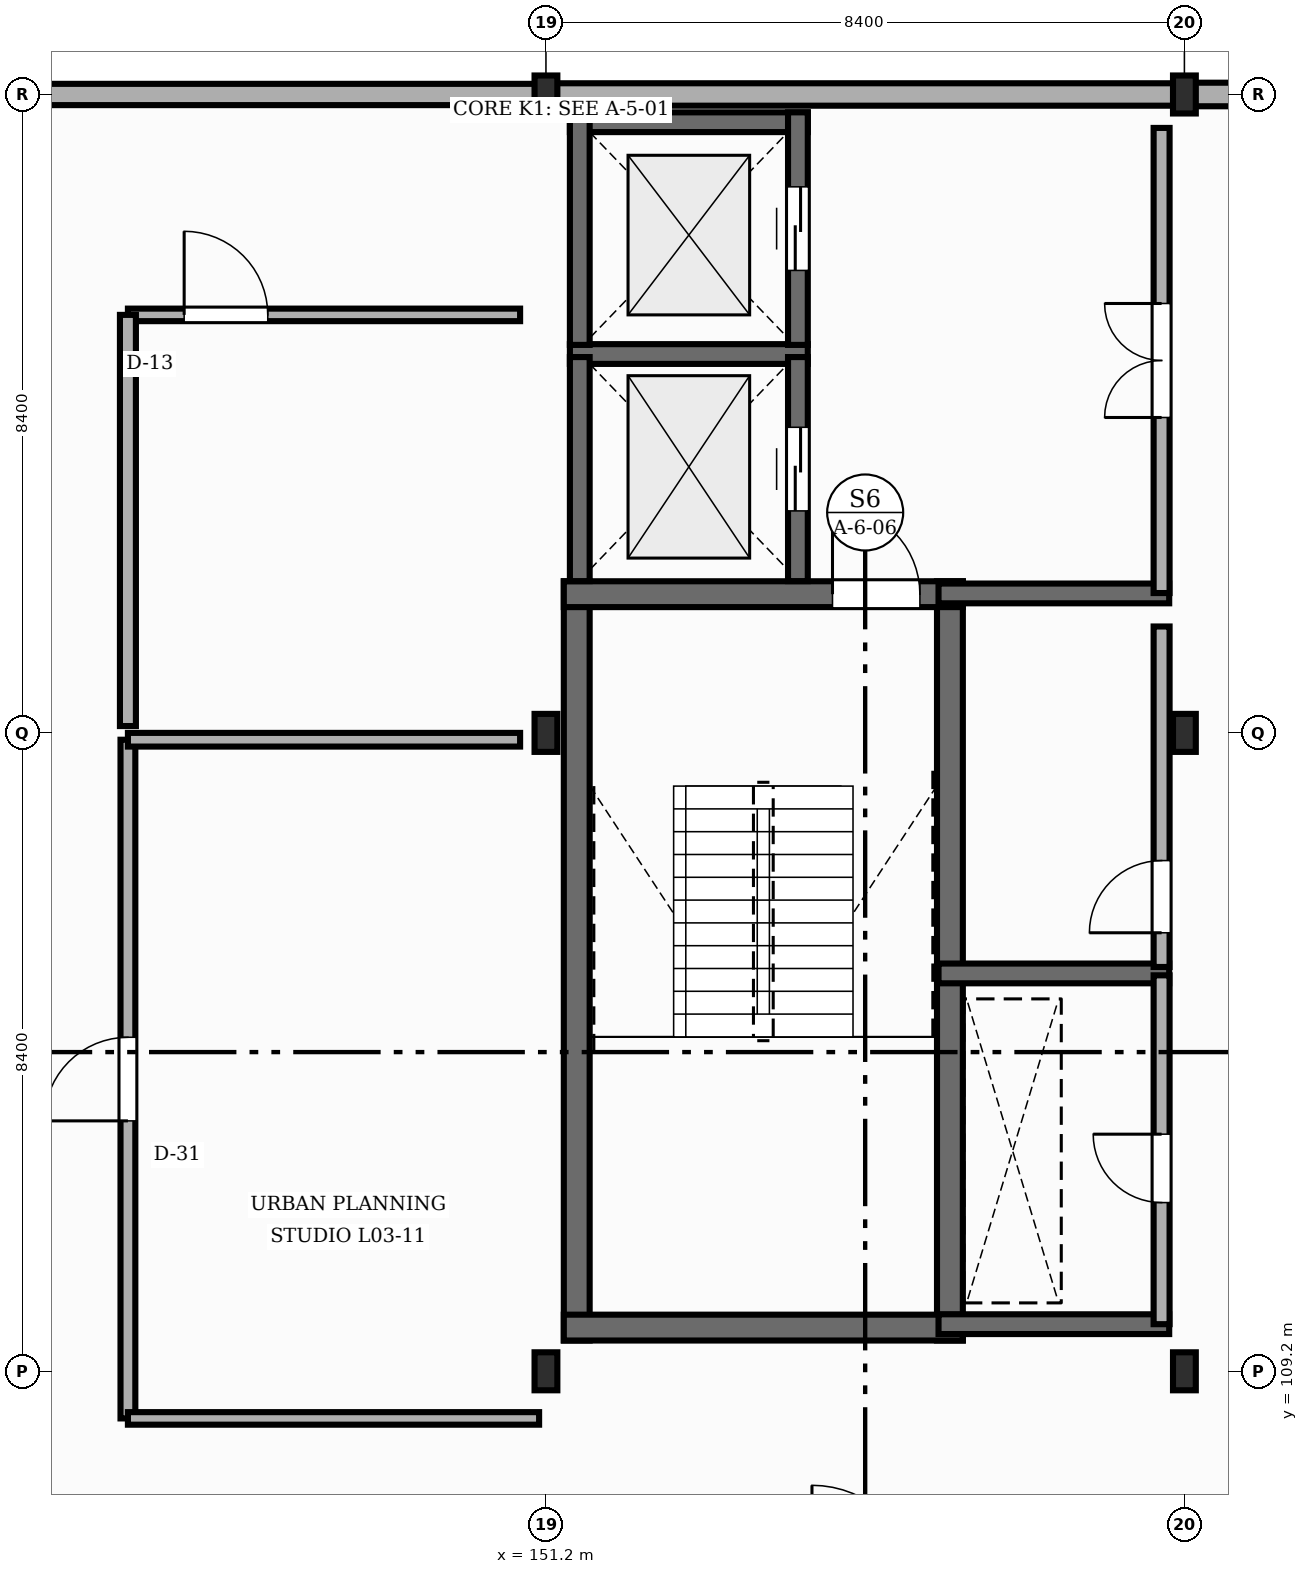
"""IFC4 building model, lengths in metres.
Left out: names, types, materials, properties, quantities, classifications, styles, units other than length and angle.
Written with IfcOpenShell. Run it as: python <this file> out.ifc"""

import sys

from ifc_helpers import new_model, si_unit, direction, frame, frame_2d, origin, origin_2d, place, context, subcontext, project, spatial, rectangle, i_section, extrude, element, fill, save


model = new_model("IFC4")
c1 = context("Model", 3, precision=1e-05, world=origin(), true_north=direction((0.0, 1.0)))
c2 = subcontext(c1, "Body", "Model", "MODEL_VIEW")
j1 = project(units=[si_unit("LENGTHUNIT", "METRE"), si_unit("PLANEANGLEUNIT", "RADIAN")], contexts=[c1])
p1 = place(None, origin())
s1 = spatial("IfcSite", under=j1, at=p1, CompositionType="ELEMENT")
p2 = place(p1, origin())
s2 = spatial("IfcBuilding", under=s1, at=p2, CompositionType="ELEMENT")
p3 = place(p2, frame((0.0, 0.0, 13.95)))
s3 = spatial("IfcBuildingStorey", under=s2, at=p3, CompositionType="ELEMENT", Elevation=13.95)
for number, where, z_axis, x_axis in (
    (1, (151.2, 109.2, 0.0), (0.0, 0.0, 1.0), (1.0, 0.0, 0.0)),
    (2, (151.2, 117.6, 0.0), (0.0, 0.0, 1.0), (1.0, 0.0, 0.0)),
    (3, (151.2, 126.0, 0.0), (0.0, 0.0, 1.0), (1.0, 0.0, 0.0)),
    (4, (159.6, 109.2, 0.0), (0.0, 0.0, 1.0), (1.0, 0.0, 0.0)),
    (5, (159.6, 117.6, 0.0), (0.0, 0.0, 1.0), (1.0, 0.0, 0.0)),
    (6, (159.6, 126.0, 0.0), (0.0, 0.0, 1.0), (1.0, 0.0, 0.0)),
):
    element("IfcColumn", number, at=place(p3, frame(where, z_axis=z_axis, x_axis=x_axis)), inside=s3, PredefinedType="COLUMN", context=c2, shape_type="SweptSolid", body=[
        extrude(i_section(OverallWidth=0.3, OverallDepth=0.5, WebThickness=0.014, FlangeThickness=0.028, FilletRadius=0.027, at=origin_2d()), origin(), (0.0, 0.0, 1.0), 4.05),
    ])
p4 = place(p3, frame((167.992, 126.0, 0.0), z_axis=(0.0, 0.0, 1.0), x_axis=(-1.0, 0.0, 0.0)))
e7 = element("IfcWall", 7, at=p4, inside=s3, PredefinedType="STANDARD", context=c2, shape_type="SweptSolid", body=[
    extrude(rectangle(XDim=8.384, YDim=0.31, at=frame_2d((4.192, 0.0))), origin(), (0.0, 0.0, 1.0), 3.487),
])
p5 = place(p3, frame((159.592, 126.0, 0.0), z_axis=(0.0, 0.0, 1.0), x_axis=(-1.0, 0.0, 0.0)))
e8 = element("IfcWall", 8, at=p5, inside=s3, PredefinedType="STANDARD", context=c2, shape_type="SweptSolid", body=[
    extrude(rectangle(XDim=8.384, YDim=0.295, at=frame_2d((4.192, 0.0))), origin(), (0.0, 0.0, 1.0), 3.517),
])
p6 = place(p3, frame((151.192, 126.0, 0.0), z_axis=(0.0, 0.0, 1.0), x_axis=(-1.0, 0.0, 0.0)))
e9 = element("IfcWall", 9, at=p6, inside=s3, PredefinedType="STANDARD", context=c2, shape_type="SweptSolid", body=[
    extrude(rectangle(XDim=8.384, YDim=0.28, at=frame_2d((4.192, 0.0))), origin(), (0.0, 0.0, 1.0), 3.487),
])
for number, where, z_axis, x_axis in (
    (10, (151.605, 109.605, 0.0), (0.0, 0.0, 1.0), (0.0, 1.0, 0.0)),
    (11, (156.515, 109.605, 0.0), (0.0, 0.0, 1.0), (0.0, 1.0, 0.0)),
):
    element("IfcWall", number, at=place(p3, frame(where, z_axis=z_axis, x_axis=x_axis)), inside=s3, PredefinedType="SHEAR", context=c2, shape_type="SweptSolid", body=[
        extrude(rectangle(XDim=9.99, YDim=0.34, at=frame_2d((4.995, 0.0))), origin(), (0.0, 0.0, 1.0), 3.85),
    ])
p7 = place(p3, frame((151.435, 109.775, 0.0), z_axis=(0.0, 0.0, 1.0), x_axis=(1.0, 0.0, 0.0)))
e12 = element("IfcWall", 12, at=p7, inside=s3, PredefinedType="SHEAR", context=c2, shape_type="SweptSolid", body=[
    extrude(rectangle(XDim=5.25, YDim=0.34, at=frame_2d((2.625, 0.0))), origin(), (0.0, 0.0, 1.0), 3.85),
])
p8 = place(p3, frame((151.435, 119.425, 0.0), z_axis=(0.0, 0.0, 1.0), x_axis=(1.0, 0.0, 0.0)))
e13 = element("IfcWall", 13, at=p8, inside=s3, PredefinedType="SHEAR", context=c2, shape_type="SweptSolid", body=[
    extrude(rectangle(XDim=5.25, YDim=0.34, at=frame_2d((2.625, 0.0))), origin(), (0.0, 0.0, 1.0), 3.85),
])
p9 = place(p8, frame((3.535, 0.0, 0.0)))
e14 = element("IfcOpeningElement", 14, at=p9, cuts=e13, PredefinedType="OPENING", context=c2, shape_type="SweptSolid", body=[
    extrude(rectangle(XDim=1.15, YDim=2.15, at=frame_2d((0.575, 1.075))), frame((0.0, 0.18, 0.0), z_axis=(0.0, -1.0, 0.0), x_axis=(1.0, 0.0, 0.0)), (0.0, 0.0, 1.0), 0.36),
])
p10 = place(p3, frame((151.515, 122.585, 0.0), z_axis=(0.0, 0.0, 1.0), x_axis=(1.0, 0.0, 0.0)))
e15 = element("IfcWall", 15, at=p10, inside=s3, PredefinedType="SHEAR", context=c2, shape_type="SweptSolid", body=[
    extrude(rectangle(XDim=3.13, YDim=0.26, at=frame_2d((1.565, 0.0))), origin(), (0.0, 0.0, 1.0), 3.85),
])
p11 = place(p3, frame((151.645, 119.597, 0.0), z_axis=(0.0, 0.0, 1.0), x_axis=(0.0, 1.0, 0.0)))
e16 = element("IfcWall", 16, at=p11, inside=s3, PredefinedType="SHEAR", context=c2, shape_type="SweptSolid", body=[
    extrude(rectangle(XDim=2.948, YDim=0.26, at=frame_2d((1.474, 0.0))), origin(), (0.0, 0.0, 1.0), 3.85),
])
p12 = place(p3, frame((154.515, 119.597, 0.0), z_axis=(0.0, 0.0, 1.0), x_axis=(0.0, 1.0, 0.0)))
e17 = element("IfcWall", 17, at=p12, inside=s3, PredefinedType="SHEAR", context=c2, shape_type="SweptSolid", body=[
    extrude(rectangle(XDim=2.948, YDim=0.26, at=frame_2d((1.474, 0.0))), origin(), (0.0, 0.0, 1.0), 3.85),
])
p13 = place(p12, frame((0.924, 0.0, 0.0)))
e18 = element("IfcOpeningElement", 18, at=p13, cuts=e17, PredefinedType="OPENING", context=c2, shape_type="SweptSolid", body=[
    extrude(rectangle(XDim=1.1, YDim=2.15, at=frame_2d((0.55, 1.075))), frame((0.0, 0.14, 0.0), z_axis=(0.0, -1.0, 0.0), x_axis=(1.0, 0.0, 0.0)), (0.0, 0.0, 1.0), 0.28),
])
p14 = place(p3, frame((151.515, 125.635, 0.0), z_axis=(0.0, 0.0, 1.0), x_axis=(1.0, 0.0, 0.0)))
e19 = element("IfcWall", 19, at=p14, inside=s3, PredefinedType="SHEAR", context=c2, shape_type="SweptSolid", body=[
    extrude(rectangle(XDim=3.13, YDim=0.26, at=frame_2d((1.565, 0.0))), origin(), (0.0, 0.0, 1.0), 3.85),
])
p15 = place(p3, frame((151.645, 122.705, 0.0), z_axis=(0.0, 0.0, 1.0), x_axis=(0.0, 1.0, 0.0)))
e20 = element("IfcWall", 20, at=p15, inside=s3, PredefinedType="SHEAR", context=c2, shape_type="SweptSolid", body=[
    extrude(rectangle(XDim=3.06, YDim=0.26, at=frame_2d((1.53, 0.0))), origin(), (0.0, 0.0, 1.0), 3.85),
])
p16 = place(p3, frame((154.515, 122.705, 0.0), z_axis=(0.0, 0.0, 1.0), x_axis=(0.0, 1.0, 0.0)))
e21 = element("IfcWall", 21, at=p16, inside=s3, PredefinedType="SHEAR", context=c2, shape_type="SweptSolid", body=[
    extrude(rectangle(XDim=3.06, YDim=0.26, at=frame_2d((1.53, 0.0))), origin(), (0.0, 0.0, 1.0), 3.85),
])
p17 = place(p16, frame((0.98, 0.0, 0.0)))
e22 = element("IfcOpeningElement", 22, at=p17, cuts=e21, PredefinedType="OPENING", context=c2, shape_type="SweptSolid", body=[
    extrude(rectangle(XDim=1.1, YDim=2.15, at=frame_2d((0.55, 1.075))), frame((0.0, 0.14, 0.0), z_axis=(0.0, -1.0, 0.0), x_axis=(1.0, 0.0, 0.0)), (0.0, 0.0, 1.0), 0.28),
])
for number, where, z_axis, x_axis in (
    (23, (156.365, 109.82, 0.0), (0.0, 0.0, 1.0), (1.0, 0.0, 0.0)),
    (24, (156.365, 114.435, 0.0), (0.0, 0.0, 1.0), (1.0, 0.0, 0.0)),
    (25, (156.365, 119.435, 0.0), (0.0, 0.0, 1.0), (1.0, 0.0, 0.0)),
):
    element("IfcWall", number, at=place(p3, frame(where, z_axis=z_axis, x_axis=x_axis)), inside=s3, PredefinedType="SHEAR", context=c2, shape_type="SweptSolid", body=[
        extrude(rectangle(XDim=3.035, YDim=0.26, at=frame_2d((1.518, 0.0))), origin(), (0.0, 0.0, 1.0), 3.85),
    ])
p18 = place(p3, frame((159.3, 109.82, 0.0), z_axis=(0.0, 0.0, 1.0), x_axis=(0.0, 1.0, 0.0)))
e26 = element("IfcWall", 26, at=p18, inside=s3, PredefinedType="STANDARD", context=c2, shape_type="SweptSolid", body=[
    extrude(rectangle(XDim=4.59, YDim=0.21, at=frame_2d((2.295, 0.0))), origin(), (0.0, 0.0, 1.0), 3.447),
])
p19 = place(p18, frame((1.6, 0.0, 0.0)))
e27 = element("IfcOpeningElement", 27, at=p19, cuts=e26, PredefinedType="OPENING", context=c2, shape_type="SweptSolid", body=[
    extrude(rectangle(XDim=0.9, YDim=2.1, at=frame_2d((0.45, 1.05))), frame((0.0, 0.115, 0.0), z_axis=(0.0, -1.0, 0.0), x_axis=(1.0, 0.0, 0.0)), (0.0, 0.0, 1.0), 0.23),
])
p20 = place(p3, frame((159.3, 114.52, 0.0), z_axis=(0.0, 0.0, 1.0), x_axis=(0.0, 1.0, 0.0)))
e28 = element("IfcWall", 28, at=p20, inside=s3, PredefinedType="STANDARD", context=c2, shape_type="SweptSolid", body=[
    extrude(rectangle(XDim=4.48, YDim=0.21, at=frame_2d((2.24, 0.0))), origin(), (0.0, 0.0, 1.0), 3.447),
])
p21 = place(p20, frame((0.45, 0.0, 0.0)))
e29 = element("IfcOpeningElement", 29, at=p21, cuts=e28, PredefinedType="OPENING", context=c2, shape_type="SweptSolid", body=[
    extrude(rectangle(XDim=0.95, YDim=2.15, at=frame_2d((0.475, 1.075))), frame((0.0, 0.115, 0.0), z_axis=(0.0, -1.0, 0.0), x_axis=(1.0, 0.0, 0.0)), (0.0, 0.0, 1.0), 0.23),
])
p22 = place(p3, frame((159.3, 119.44, 0.0), z_axis=(0.0, 0.0, 1.0), x_axis=(0.0, 1.0, 0.0)))
e30 = element("IfcWall", 30, at=p22, inside=s3, PredefinedType="STANDARD", context=c2, shape_type="SweptSolid", body=[
    extrude(rectangle(XDim=6.12, YDim=0.21, at=frame_2d((3.06, 0.0))), origin(), (0.0, 0.0, 1.0), 3.497),
])
p23 = place(p22, frame((2.31, 0.0, 0.0)))
e31 = element("IfcOpeningElement", 31, at=p23, cuts=e30, PredefinedType="OPENING", context=c2, shape_type="SweptSolid", body=[
    extrude(rectangle(XDim=1.5, YDim=2.2, at=frame_2d((0.75, 1.1))), frame((0.0, 0.115, 0.0), z_axis=(0.0, -1.0, 0.0), x_axis=(1.0, 0.0, 0.0)), (0.0, 0.0, 1.0), 0.23),
])
p24 = place(p3, frame((145.7, 108.58, -0.004), z_axis=(0.0, 0.0, 1.0), x_axis=(0.0, 1.0, 0.0)))
e32 = element("IfcWall", 32, at=p24, inside=s3, PredefinedType="STANDARD", context=c2, shape_type="SweptSolid", body=[
    extrude(rectangle(XDim=8.93, YDim=0.195, at=frame_2d((4.465, 0.0))), origin(), (0.0, 0.0, 1.0), 3.611),
])
p25 = place(p24, frame((3.915, 0.0, 0.0)))
e33 = element("IfcOpeningElement", 33, at=p25, cuts=e32, PredefinedType="OPENING", context=c2, shape_type="SweptSolid", body=[
    extrude(rectangle(XDim=1.1, YDim=2.3, at=frame_2d((0.55, 1.15))), frame((0.0, 0.107, 0.0), z_axis=(0.0, -1.0, 0.0), x_axis=(1.0, 0.0, 0.0)), (0.0, 0.0, 1.0), 0.215),
])
p26 = place(p3, frame((145.7, 117.51, -0.004), z_axis=(0.0, 0.0, 1.0), x_axis=(1.0, 0.0, 0.0)))
e34 = element("IfcWall", 34, at=p26, inside=s3, PredefinedType="STANDARD", context=c2, shape_type="SweptSolid", body=[
    extrude(rectangle(XDim=5.16, YDim=0.18, at=frame_2d((2.58, 0.0))), origin(), (0.0, 0.0, 1.0), 3.351),
])
p27 = place(p3, frame((151.11, 108.58, -0.004), z_axis=(0.0, 0.0, 1.0), x_axis=(-1.0, 0.0, 0.0)))
e35 = element("IfcWall", 35, at=p27, inside=s3, PredefinedType="STANDARD", context=c2, shape_type="SweptSolid", body=[
    extrude(rectangle(XDim=5.41, YDim=0.165, at=frame_2d((2.705, 0.0))), origin(), (0.0, 0.0, 1.0), 3.854),
])
p28 = place(p3, frame((145.7, 123.1, -0.004), z_axis=(0.0, 0.0, 1.0), x_axis=(1.0, 0.0, 0.0)))
e36 = element("IfcWall", 36, at=p28, inside=s3, PredefinedType="STANDARD", context=c2, shape_type="SweptSolid", body=[
    extrude(rectangle(XDim=5.16, YDim=0.165, at=frame_2d((2.58, 0.0))), origin(), (0.0, 0.0, 1.0), 3.854),
])
p29 = place(p28, frame((0.74, 0.0, 0.0)))
e37 = element("IfcOpeningElement", 37, at=p29, cuts=e36, PredefinedType="OPENING", context=c2, shape_type="SweptSolid", body=[
    extrude(rectangle(XDim=1.1, YDim=2.14, at=frame_2d((0.55, 1.07))), frame((0.0, 0.093, 0.0), z_axis=(0.0, -1.0, 0.0), x_axis=(1.0, 0.0, 0.0)), (0.0, 0.0, 1.0), 0.185),
])
p30 = place(p3, frame((145.7, 117.69, -0.004), z_axis=(0.0, 0.0, 1.0), x_axis=(0.0, 1.0, 0.0)))
e38 = element("IfcWall", 38, at=p30, inside=s3, PredefinedType="STANDARD", context=c2, shape_type="SweptSolid", body=[
    extrude(rectangle(XDim=5.41, YDim=0.21, at=frame_2d((2.705, 0.0))), origin(), (0.0, 0.0, 1.0), 3.551),
])
p31 = place(p9, origin())
e39 = element("IfcDoor", 39, at=p31, inside=s3, OperationType="SINGLE_SWING_LEFT", PredefinedType="DOOR", context=c2, shape_type="SweptSolid", body=[
    extrude(rectangle(XDim=1.15, YDim=2.15, at=frame_2d((0.575, 1.075))), frame((0.0, 0.025, 0.0), z_axis=(0.0, -1.0, 0.0), x_axis=(1.0, 0.0, 0.0)), (0.0, 0.0, 1.0), 0.05),
])
fill(e14, e39)
p32 = place(p13, origin())
e40 = element("IfcDoor", 40, at=p32, inside=s3, OperationType="DOUBLE_DOOR_SLIDING", PredefinedType="DOOR", context=c2, shape_type="SweptSolid", body=[
    extrude(rectangle(XDim=1.1, YDim=2.15, at=frame_2d((0.55, 1.075))), frame((0.0, 0.025, 0.0), z_axis=(0.0, -1.0, 0.0), x_axis=(1.0, 0.0, 0.0)), (0.0, 0.0, 1.0), 0.05),
])
fill(e18, e40)
p33 = place(p17, origin())
e41 = element("IfcDoor", 41, at=p33, inside=s3, OperationType="DOUBLE_DOOR_SLIDING", PredefinedType="DOOR", context=c2, shape_type="SweptSolid", body=[
    extrude(rectangle(XDim=1.1, YDim=2.15, at=frame_2d((0.55, 1.075))), frame((0.0, 0.025, 0.0), z_axis=(0.0, -1.0, 0.0), x_axis=(1.0, 0.0, 0.0)), (0.0, 0.0, 1.0), 0.05),
])
fill(e22, e41)
p34 = place(p19, origin())
e42 = element("IfcDoor", 42, at=p34, inside=s3, OperationType="SINGLE_SWING_RIGHT", PredefinedType="DOOR", context=c2, shape_type="SweptSolid", body=[
    extrude(rectangle(XDim=0.9, YDim=2.1, at=frame_2d((0.45, 1.05))), frame((0.0, 0.025, 0.0), z_axis=(0.0, -1.0, 0.0), x_axis=(1.0, 0.0, 0.0)), (0.0, 0.0, 1.0), 0.05),
])
fill(e27, e42)
p35 = place(p21, origin())
e43 = element("IfcDoor", 43, at=p35, inside=s3, OperationType="SINGLE_SWING_LEFT", PredefinedType="DOOR", context=c2, shape_type="SweptSolid", body=[
    extrude(rectangle(XDim=0.95, YDim=2.15, at=frame_2d((0.475, 1.075))), frame((0.0, 0.025, 0.0), z_axis=(0.0, -1.0, 0.0), x_axis=(1.0, 0.0, 0.0)), (0.0, 0.0, 1.0), 0.05),
])
fill(e29, e43)
p36 = place(p23, origin())
e44 = element("IfcDoor", 44, at=p36, inside=s3, OperationType="DOUBLE_DOOR_SINGLE_SWING", PredefinedType="DOOR", context=c2, shape_type="SweptSolid", body=[
    extrude(rectangle(XDim=1.5, YDim=2.2, at=frame_2d((0.75, 1.1))), frame((0.0, 0.025, 0.0), z_axis=(0.0, -1.0, 0.0), x_axis=(1.0, 0.0, 0.0)), (0.0, 0.0, 1.0), 0.05),
])
fill(e31, e44)
p37 = place(p25, origin())
e45 = element("IfcDoor", 45, at=p37, inside=s3, OperationType="SINGLE_SWING_LEFT", PredefinedType="DOOR", context=c2, shape_type="SweptSolid", body=[
    extrude(rectangle(XDim=1.1, YDim=2.3, at=frame_2d((0.55, 1.15))), frame((0.0, 0.025, 0.0), z_axis=(0.0, -1.0, 0.0), x_axis=(1.0, 0.0, 0.0)), (0.0, 0.0, 1.0), 0.05),
])
fill(e33, e45)
p38 = place(p29, origin())
e46 = element("IfcDoor", 46, at=p38, inside=s3, OperationType="SINGLE_SWING_LEFT", PredefinedType="DOOR", context=c2, shape_type="SweptSolid", body=[
    extrude(rectangle(XDim=1.1, YDim=2.14, at=frame_2d((0.55, 1.07))), frame((0.0, 0.025, 0.0), z_axis=(0.0, -1.0, 0.0), x_axis=(1.0, 0.0, 0.0)), (0.0, 0.0, 1.0), 0.05),
])
fill(e37, e46)
save(model, sys.argv[1])
